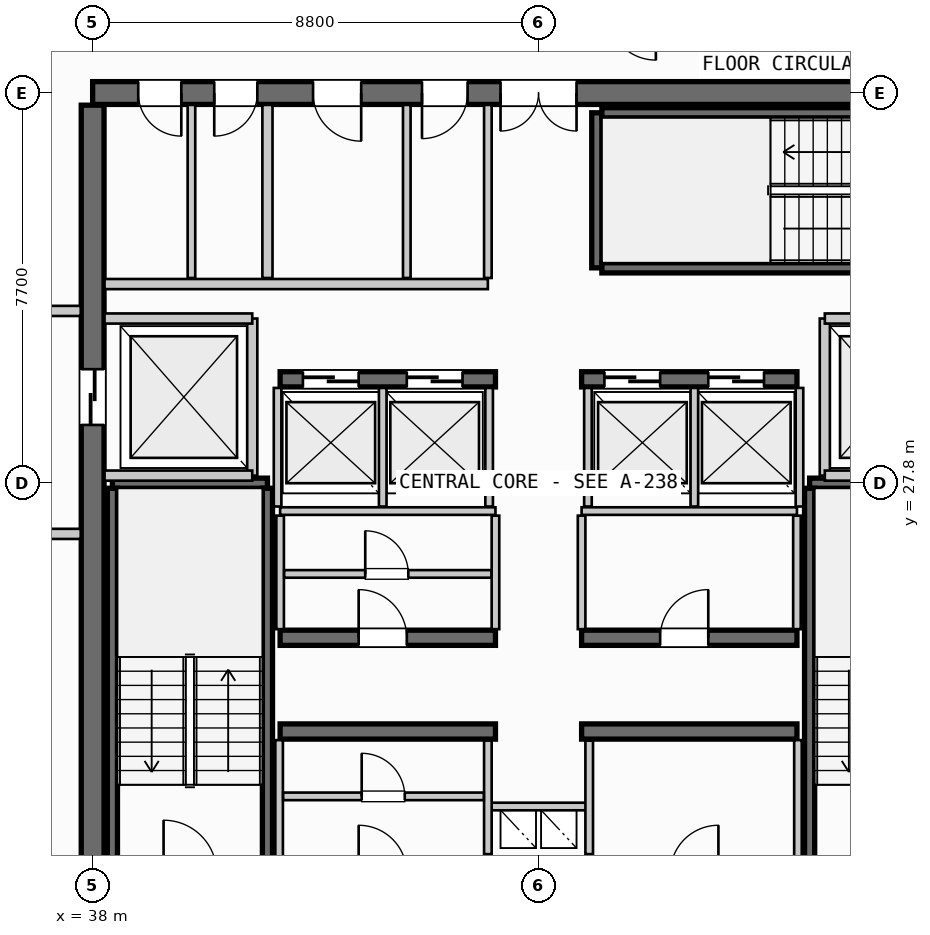
"""IFC4 building model, lengths in metres.
Left out: names, types, materials, properties, quantities, classifications, styles, units other than length and angle.
Written with IfcOpenShell. Run it as: python <this file> out.ifc"""

import sys

from ifc_helpers import new_model, si_unit, direction, frame, frame_2d, origin, place, context, subcontext, project, spatial, rectangle, extrude, source, transform, mapped, element, fill, save


model = new_model("IFC4")
c1 = context("Model", 3, precision=1e-05, world=origin(), true_north=direction((0.0, 1.0)))
c2 = subcontext(c1, "Body", "Model", "MODEL_VIEW")
j1 = project(units=[si_unit("LENGTHUNIT", "METRE"), si_unit("PLANEANGLEUNIT", "RADIAN")], contexts=[c1])
p1 = place(None, origin())
s1 = spatial("IfcSite", under=j1, at=p1, CompositionType="ELEMENT")
p2 = place(p1, origin())
s2 = spatial("IfcBuilding", under=s1, at=p2, CompositionType="ELEMENT")
p3 = place(p2, frame((0.0, 0.0, 273.25)))
s3 = spatial("IfcBuildingStorey", under=s2, at=p3, CompositionType="ELEMENT", Elevation=273.25)
p4 = place(p3, frame((55.6, 35.5, 0.0), z_axis=(0.0, 0.0, 1.0), x_axis=(-1.0, 0.0, 0.0)))
e1 = element("IfcWall", 1, at=p4, inside=s3, PredefinedType="SHEAR", context=c2, shape_type="SweptSolid", body=[
    extrude(rectangle(XDim=17.6, YDim=0.45, at=frame_2d((8.8, 0.0))), origin(), (0.0, 0.0, 1.0), 3.21),
])
p5 = place(p4, frame((8.05, 0.0, 0.0)))
e2 = element("IfcOpeningElement", 2, at=p5, cuts=e1, PredefinedType="OPENING", context=c2, shape_type="SweptSolid", body=[
    extrude(rectangle(XDim=1.5, YDim=2.2, at=frame_2d((0.75, 1.1))), frame((0.0, 0.235, 0.0), z_axis=(0.0, -1.0, 0.0), x_axis=(1.0, 0.0, 0.0)), (0.0, 0.0, 1.0), 0.47),
])
p6 = place(p4, frame((15.85, 0.0, 0.0)))
e3 = element("IfcOpeningElement", 3, at=p6, cuts=e1, PredefinedType="OPENING", context=c2, shape_type="SweptSolid", body=[
    extrude(rectangle(XDim=0.85, YDim=2.15, at=frame_2d((0.425, 1.075))), frame((0.0, 0.235, 0.0), z_axis=(0.0, -1.0, 0.0), x_axis=(1.0, 0.0, 0.0)), (0.0, 0.0, 1.0), 0.47),
])
p7 = place(p4, frame((14.35, 0.0, 0.0)))
e4 = element("IfcOpeningElement", 4, at=p7, cuts=e1, PredefinedType="OPENING", context=c2, shape_type="SweptSolid", body=[
    extrude(rectangle(XDim=0.85, YDim=2.15, at=frame_2d((0.425, 1.075))), frame((0.0, 0.235, 0.0), z_axis=(0.0, -1.0, 0.0), x_axis=(1.0, 0.0, 0.0)), (0.0, 0.0, 1.0), 0.47),
])
p8 = place(p4, frame((12.3, 0.0, 0.0)))
e5 = element("IfcOpeningElement", 5, at=p8, cuts=e1, PredefinedType="OPENING", context=c2, shape_type="SweptSolid", body=[
    extrude(rectangle(XDim=0.95, YDim=2.15, at=frame_2d((0.475, 1.075))), frame((0.0, 0.235, 0.0), z_axis=(0.0, -1.0, 0.0), x_axis=(1.0, 0.0, 0.0)), (0.0, 0.0, 1.0), 0.47),
])
p9 = place(p4, frame((10.2, 0.0, 0.0)))
e6 = element("IfcOpeningElement", 6, at=p9, cuts=e1, PredefinedType="OPENING", context=c2, shape_type="SweptSolid", body=[
    extrude(rectangle(XDim=0.9, YDim=2.15, at=frame_2d((0.45, 1.075))), frame((0.0, 0.235, 0.0), z_axis=(0.0, -1.0, 0.0), x_axis=(1.0, 0.0, 0.0)), (0.0, 0.0, 1.0), 0.47),
])
p10 = place(p3, frame((38.0, 35.26, 0.0), z_axis=(0.0, 0.0, 1.0), x_axis=(0.0, -1.0, 0.0)))
e7 = element("IfcWall", 7, at=p10, inside=s3, PredefinedType="SHEAR", context=c2, shape_type="SweptSolid", body=[
    extrude(rectangle(XDim=14.92, YDim=0.45, at=frame_2d((7.46, 0.0))), origin(), (0.0, 0.0, 1.0), 3.21),
])
p11 = place(p10, frame((5.21, 0.0, 0.0)))
e8 = element("IfcOpeningElement", 8, at=p11, cuts=e7, PredefinedType="OPENING", context=c2, shape_type="SweptSolid", body=[
    extrude(rectangle(XDim=1.1, YDim=2.2, at=frame_2d((0.55, 1.1))), frame((0.0, 0.235, 0.0), z_axis=(0.0, -1.0, 0.0), x_axis=(1.0, 0.0, 0.0)), (0.0, 0.0, 1.0), 0.47),
])
for number, where, z_axis, x_axis in (
    (9, (41.7, 22.9, 0.0), (0.0, 0.0, 1.0), (1.0, 0.0, 0.0)),
    (10, (47.65, 22.9, 0.0), (0.0, 0.0, 1.0), (1.0, 0.0, 0.0)),
):
    element("IfcWall", number, at=place(p3, frame(where, z_axis=z_axis, x_axis=x_axis)), inside=s3, PredefinedType="SHEAR", context=c2, shape_type="SweptSolid", body=[
        extrude(rectangle(XDim=4.25, YDim=0.3, at=frame_2d((2.125, 0.0))), origin(), (0.0, 0.0, 1.0), 3.21),
    ])
p12 = place(p3, frame((41.7, 24.75, 0.0), z_axis=(0.0, 0.0, 1.0), x_axis=(1.0, 0.0, 0.0)))
e11 = element("IfcWall", 11, at=p12, inside=s3, PredefinedType="SHEAR", context=c2, shape_type="SweptSolid", body=[
    extrude(rectangle(XDim=4.25, YDim=0.3, at=frame_2d((2.125, 0.0))), origin(), (0.0, 0.0, 1.0), 3.21),
])
p13 = place(p12, frame((1.55, 0.0, 0.0)))
e12 = element("IfcOpeningElement", 12, at=p13, cuts=e11, PredefinedType="OPENING", context=c2, shape_type="SweptSolid", body=[
    extrude(rectangle(XDim=0.95, YDim=2.15, at=frame_2d((0.475, 1.075))), frame((0.0, 0.16, 0.0), z_axis=(0.0, -1.0, 0.0), x_axis=(1.0, 0.0, 0.0)), (0.0, 0.0, 1.0), 0.32),
])
p14 = place(p3, frame((47.65, 24.75, 0.0), z_axis=(0.0, 0.0, 1.0), x_axis=(1.0, 0.0, 0.0)))
e13 = element("IfcWall", 13, at=p14, inside=s3, PredefinedType="SHEAR", context=c2, shape_type="SweptSolid", body=[
    extrude(rectangle(XDim=4.25, YDim=0.3, at=frame_2d((2.125, 0.0))), origin(), (0.0, 0.0, 1.0), 3.21),
])
p15 = place(p14, frame((1.55, 0.0, 0.0)))
e14 = element("IfcOpeningElement", 14, at=p15, cuts=e13, PredefinedType="OPENING", context=c2, shape_type="SweptSolid", body=[
    extrude(rectangle(XDim=0.95, YDim=2.15, at=frame_2d((0.475, 1.075))), frame((0.0, 0.16, 0.0), z_axis=(0.0, -1.0, 0.0), x_axis=(1.0, 0.0, 0.0)), (0.0, 0.0, 1.0), 0.32),
])
p16 = place(p3, frame((41.7, 29.85, 0.0), z_axis=(0.0, 0.0, 1.0), x_axis=(1.0, 0.0, 0.0)))
e15 = element("IfcWall", 15, at=p16, inside=s3, PredefinedType="SHEAR", context=c2, shape_type="SweptSolid", body=[
    extrude(rectangle(XDim=4.25, YDim=0.3, at=frame_2d((2.125, 0.0))), origin(), (0.0, 0.0, 1.0), 3.21),
])
p17 = place(p16, frame((0.45, 0.0, 0.0)))
e16 = element("IfcOpeningElement", 16, at=p17, cuts=e15, PredefinedType="OPENING", context=c2, shape_type="SweptSolid", body=[
    extrude(rectangle(XDim=1.1, YDim=2.2, at=frame_2d((0.55, 1.1))), frame((0.0, 0.16, 0.0), z_axis=(0.0, -1.0, 0.0), x_axis=(1.0, 0.0, 0.0)), (0.0, 0.0, 1.0), 0.32),
])
p18 = place(p16, frame((2.5, 0.0, 0.0)))
e17 = element("IfcOpeningElement", 17, at=p18, cuts=e15, PredefinedType="OPENING", context=c2, shape_type="SweptSolid", body=[
    extrude(rectangle(XDim=1.1, YDim=2.2, at=frame_2d((0.55, 1.1))), frame((0.0, 0.16, 0.0), z_axis=(0.0, -1.0, 0.0), x_axis=(1.0, 0.0, 0.0)), (0.0, 0.0, 1.0), 0.32),
])
p19 = place(p3, frame((47.65, 29.85, 0.0), z_axis=(0.0, 0.0, 1.0), x_axis=(1.0, 0.0, 0.0)))
e18 = element("IfcWall", 18, at=p19, inside=s3, PredefinedType="SHEAR", context=c2, shape_type="SweptSolid", body=[
    extrude(rectangle(XDim=4.25, YDim=0.3, at=frame_2d((2.125, 0.0))), origin(), (0.0, 0.0, 1.0), 3.21),
])
p20 = place(p19, frame((0.45, 0.0, 0.0)))
e19 = element("IfcOpeningElement", 19, at=p20, cuts=e18, PredefinedType="OPENING", context=c2, shape_type="SweptSolid", body=[
    extrude(rectangle(XDim=1.1, YDim=2.2, at=frame_2d((0.55, 1.1))), frame((0.0, 0.16, 0.0), z_axis=(0.0, -1.0, 0.0), x_axis=(1.0, 0.0, 0.0)), (0.0, 0.0, 1.0), 0.32),
])
p21 = place(p19, frame((2.5, 0.0, 0.0)))
e20 = element("IfcOpeningElement", 20, at=p21, cuts=e18, PredefinedType="OPENING", context=c2, shape_type="SweptSolid", body=[
    extrude(rectangle(XDim=1.1, YDim=2.2, at=frame_2d((0.55, 1.1))), frame((0.0, 0.16, 0.0), z_axis=(0.0, -1.0, 0.0), x_axis=(1.0, 0.0, 0.0)), (0.0, 0.0, 1.0), 0.32),
])
p22 = place(p3, frame((38.39, 27.8, 0.0), z_axis=(0.0, 0.0, 1.0), x_axis=(1.0, 0.0, 0.0)))
e21 = element("IfcWall", 21, at=p22, inside=s3, PredefinedType="SHEAR", context=c2, shape_type="SweptSolid", body=[
    extrude(rectangle(XDim=3.06, YDim=0.2, at=frame_2d((1.53, 0.0))), origin(), (0.0, 0.0, 1.0), 3.21),
])
for number, where, z_axis, x_axis in (
    (22, (41.45, 27.7, 0.0), (0.0, 0.0, 1.0), (0.0, -1.0, 0.0)),
    (23, (38.39, 20.35, 0.0), (0.0, 0.0, 1.0), (0.0, 1.0, 0.0)),
):
    element("IfcWall", number, at=place(p3, frame(where, z_axis=z_axis, x_axis=x_axis)), inside=s3, PredefinedType="SHEAR", context=c2, shape_type="SweptSolid", body=[
        extrude(rectangle(XDim=7.35, YDim=0.2, at=frame_2d((3.675, 0.0))), origin(), (0.0, 0.0, 1.0), 3.21),
    ])
p23 = place(p3, frame((52.15, 27.8, 0.0), z_axis=(0.0, 0.0, 1.0), x_axis=(1.0, 0.0, 0.0)))
e24 = element("IfcWall", 24, at=p23, inside=s3, PredefinedType="SHEAR", context=c2, shape_type="SweptSolid", body=[
    extrude(rectangle(XDim=3.06, YDim=0.2, at=frame_2d((1.53, 0.0))), origin(), (0.0, 0.0, 1.0), 3.21),
])
p24 = place(p3, frame((52.15, 20.35, 0.0), z_axis=(0.0, 0.0, 1.0), x_axis=(0.0, 1.0, 0.0)))
e25 = element("IfcWall", 25, at=p24, inside=s3, PredefinedType="SHEAR", context=c2, shape_type="SweptSolid", body=[
    extrude(rectangle(XDim=7.35, YDim=0.2, at=frame_2d((3.675, 0.0))), origin(), (0.0, 0.0, 1.0), 3.21),
])
p25 = place(p3, frame((47.95, 32.05, 0.0), z_axis=(0.0, 0.0, 1.0), x_axis=(0.0, 1.0, 0.0)))
e26 = element("IfcWall", 26, at=p25, inside=s3, PredefinedType="SHEAR", context=c2, shape_type="SweptSolid", body=[
    extrude(rectangle(XDim=3.06, YDim=0.2, at=frame_2d((1.53, 0.0))), origin(), (0.0, 0.0, 1.0), 3.21),
])
for number, where, z_axis, x_axis in (
    (27, (48.05, 35.11, 0.0), (0.0, 0.0, 1.0), (1.0, 0.0, 0.0)),
    (28, (55.4, 32.05, 0.0), (0.0, 0.0, 1.0), (-1.0, 0.0, 0.0)),
):
    element("IfcWall", number, at=place(p3, frame(where, z_axis=z_axis, x_axis=x_axis)), inside=s3, PredefinedType="SHEAR", context=c2, shape_type="SweptSolid", body=[
        extrude(rectangle(XDim=7.35, YDim=0.2, at=frame_2d((3.675, 0.0))), origin(), (0.0, 0.0, 1.0), 3.21),
    ])
p26 = place(p3, frame((45.8, 21.42, 0.0), z_axis=(0.0, 0.0, 1.0), x_axis=(1.0, 0.0, 0.0)))
e29 = element("IfcWall", 29, at=p26, inside=s3, PredefinedType="PARTITIONING", context=c2, shape_type="SweptSolid", body=[
    extrude(rectangle(XDim=2.0, YDim=0.15, at=frame_2d((1.0, 0.0))), origin(), (0.0, 0.0, 1.0), 2.595),
])
for number, where, z_axis, x_axis in (
    (30, (45.8, 20.48, 0.0), (0.0, 0.0, 1.0), (0.0, 1.0, 0.0)),
    (31, (47.8, 20.48, 0.0), (0.0, 0.0, 1.0), (0.0, 1.0, 0.0)),
):
    element("IfcWall", number, at=place(p3, frame(where, z_axis=z_axis, x_axis=x_axis)), inside=s3, PredefinedType="PARTITIONING", context=c2, shape_type="SweptSolid", body=[
        extrude(rectangle(XDim=2.24, YDim=0.15, at=frame_2d((1.12, 0.0))), origin(), (0.0, 0.0, 1.0), 2.595),
    ])
p27 = place(p3, frame((41.15, 27.95, 0.0), z_axis=(0.0, 0.0, 1.0), x_axis=(0.0, 1.0, 0.0)))
e32 = element("IfcWall", 32, at=p27, inside=s3, PredefinedType="PARTITIONING", context=c2, shape_type="SweptSolid", body=[
    extrude(rectangle(XDim=3.1, YDim=0.2, at=frame_2d((1.55, 0.0))), origin(), (0.0, 0.0, 1.0), 2.595),
])
for number, where, z_axis, x_axis in (
    (33, (38.235, 27.95, 0.0), (0.0, 0.0, 1.0), (1.0, 0.0, 0.0)),
    (34, (38.235, 31.05, 0.0), (0.0, 0.0, 1.0), (1.0, 0.0, 0.0)),
):
    element("IfcWall", number, at=place(p3, frame(where, z_axis=z_axis, x_axis=x_axis)), inside=s3, PredefinedType="PARTITIONING", context=c2, shape_type="SweptSolid", body=[
        extrude(rectangle(XDim=2.915, YDim=0.2, at=frame_2d((1.458, 0.0))), origin(), (0.0, 0.0, 1.0), 2.595),
    ])
for number, where, z_axis, x_axis in (
    (35, (34.5, 26.8, 0.0), (0.0, 0.0, 1.0), (1.0, 0.0, 0.0)),
    (36, (34.5, 31.2, 0.0), (0.0, 0.0, 1.0), (1.0, 0.0, 0.0)),
):
    element("IfcWall", number, at=place(p3, frame(where, z_axis=z_axis, x_axis=x_axis)), inside=s3, PredefinedType="PARTITIONING", context=c2, shape_type="SweptSolid", body=[
        extrude(rectangle(XDim=3.265, YDim=0.2, at=frame_2d((1.632, 0.0))), origin(), (0.0, 0.0, 1.0), 2.595),
    ])
p28 = place(p3, frame((52.45, 27.95, 0.0), z_axis=(0.0, 0.0, 1.0), x_axis=(0.0, 1.0, 0.0)))
e37 = element("IfcWall", 37, at=p28, inside=s3, PredefinedType="PARTITIONING", context=c2, shape_type="SweptSolid", body=[
    extrude(rectangle(XDim=3.1, YDim=0.2, at=frame_2d((1.55, 0.0))), origin(), (0.0, 0.0, 1.0), 2.595),
])
for number, where, z_axis, x_axis in (
    (38, (52.45, 27.95, 0.0), (0.0, 0.0, 1.0), (1.0, 0.0, 0.0)),
    (39, (52.45, 31.05, 0.0), (0.0, 0.0, 1.0), (1.0, 0.0, 0.0)),
):
    element("IfcWall", number, at=place(p3, frame(where, z_axis=z_axis, x_axis=x_axis)), inside=s3, PredefinedType="PARTITIONING", context=c2, shape_type="SweptSolid", body=[
        extrude(rectangle(XDim=2.915, YDim=0.2, at=frame_2d((1.458, 0.0))), origin(), (0.0, 0.0, 1.0), 2.595),
    ])
for number, where, z_axis, x_axis in (
    (40, (41.68, 20.335, 0.0), (0.0, 0.0, 1.0), (0.0, 1.0, 0.0)),
    (41, (51.92, 20.335, 0.0), (0.0, 0.0, 1.0), (0.0, 1.0, 0.0)),
):
    element("IfcWall", number, at=place(p3, frame(where, z_axis=z_axis, x_axis=x_axis)), inside=s3, PredefinedType="PARTITIONING", context=c2, shape_type="SweptSolid", body=[
        extrude(rectangle(XDim=2.395, YDim=0.15, at=frame_2d((1.198, 0.0))), origin(), (0.0, 0.0, 1.0), 2.595),
    ])
p29 = place(p3, frame((41.76, 21.62, 0.0), z_axis=(0.0, 0.0, 1.0), x_axis=(1.0, 0.0, 0.0)))
e42 = element("IfcWall", 42, at=p29, inside=s3, PredefinedType="PARTITIONING", context=c2, shape_type="SweptSolid", body=[
    extrude(rectangle(XDim=3.96, YDim=0.15, at=frame_2d((1.98, 0.0))), origin(), (0.0, 0.0, 1.0), 2.595),
])
p30 = place(p29, frame((1.55, 0.0, 0.0)))
e43 = element("IfcOpeningElement", 43, at=p30, cuts=e42, PredefinedType="OPENING", context=c2, shape_type="SweptSolid", body=[
    extrude(rectangle(XDim=0.85, YDim=2.15, at=frame_2d((0.425, 1.075))), frame((0.0, 0.085, 0.0), z_axis=(0.0, -1.0, 0.0), x_axis=(1.0, 0.0, 0.0)), (0.0, 0.0, 1.0), 0.17),
])
for number, where, z_axis, x_axis in (
    (44, (41.7, 27.25, 0.0), (0.0, 0.0, 1.0), (1.0, 0.0, 0.0)),
    (45, (47.65, 27.25, 0.0), (0.0, 0.0, 1.0), (1.0, 0.0, 0.0)),
):
    element("IfcWall", number, at=place(p3, frame(where, z_axis=z_axis, x_axis=x_axis)), inside=s3, PredefinedType="PARTITIONING", context=c2, shape_type="SweptSolid", body=[
        extrude(rectangle(XDim=4.25, YDim=0.15, at=frame_2d((2.125, 0.0))), origin(), (0.0, 0.0, 1.0), 2.595),
    ])
for number, where, z_axis, x_axis in (
    (46, (41.7, 24.92, 0.0), (0.0, 0.0, 1.0), (0.0, 1.0, 0.0)),
    (47, (45.95, 24.92, 0.0), (0.0, 0.0, 1.0), (0.0, 1.0, 0.0)),
    (48, (47.65, 24.92, 0.0), (0.0, 0.0, 1.0), (0.0, 1.0, 0.0)),
    (49, (51.9, 24.92, 0.0), (0.0, 0.0, 1.0), (0.0, 1.0, 0.0)),
):
    element("IfcWall", number, at=place(p3, frame(where, z_axis=z_axis, x_axis=x_axis)), inside=s3, PredefinedType="PARTITIONING", context=c2, shape_type="SweptSolid", body=[
        extrude(rectangle(XDim=2.24, YDim=0.15, at=frame_2d((1.12, 0.0))), origin(), (0.0, 0.0, 1.0), 2.595),
    ])
p31 = place(p3, frame((41.78, 26.01, 0.0), z_axis=(0.0, 0.0, 1.0), x_axis=(1.0, 0.0, 0.0)))
e50 = element("IfcWall", 50, at=p31, inside=s3, PredefinedType="PARTITIONING", context=c2, shape_type="SweptSolid", body=[
    extrude(rectangle(XDim=4.09, YDim=0.15, at=frame_2d((2.045, 0.0))), origin(), (0.0, 0.0, 1.0), 2.595),
])
p32 = place(p31, frame((1.6, 0.0, 0.0)))
e51 = element("IfcOpeningElement", 51, at=p32, cuts=e50, PredefinedType="OPENING", context=c2, shape_type="SweptSolid", body=[
    extrude(rectangle(XDim=0.85, YDim=2.15, at=frame_2d((0.425, 1.075))), frame((0.0, 0.085, 0.0), z_axis=(0.0, -1.0, 0.0), x_axis=(1.0, 0.0, 0.0)), (0.0, 0.0, 1.0), 0.17),
])
for number, where, z_axis, x_axis in (
    (52, (41.65, 27.34, 0.0), (0.0, 0.0, 1.0), (0.0, 1.0, 0.0)),
    (53, (43.725, 27.34, 0.0), (0.0, 0.0, 1.0), (0.0, 1.0, 0.0)),
    (54, (45.825, 27.34, 0.0), (0.0, 0.0, 1.0), (0.0, 1.0, 0.0)),
    (55, (47.775, 27.34, 0.0), (0.0, 0.0, 1.0), (0.0, 1.0, 0.0)),
    (56, (49.875, 27.34, 0.0), (0.0, 0.0, 1.0), (0.0, 1.0, 0.0)),
    (57, (51.95, 27.34, 0.0), (0.0, 0.0, 1.0), (0.0, 1.0, 0.0)),
):
    element("IfcWall", number, at=place(p3, frame(where, z_axis=z_axis, x_axis=x_axis)), inside=s3, PredefinedType="PARTITIONING", context=c2, shape_type="SweptSolid", body=[
        extrude(rectangle(XDim=2.34, YDim=0.15, at=frame_2d((1.17, 0.0))), origin(), (0.0, 0.0, 1.0), 2.595),
    ])
p33 = place(p3, frame((41.45, 31.85, 0.0), z_axis=(0.0, 0.0, 1.0), x_axis=(0.0, 1.0, 0.0)))
e58 = element("IfcWall", 58, at=p33, inside=s3, PredefinedType="PARTITIONING", context=c2, shape_type="SweptSolid", body=[
    extrude(rectangle(XDim=3.415, YDim=0.2, at=frame_2d((1.708, 0.0))), origin(), (0.0, 0.0, 1.0), 2.595),
])
p34 = place(p3, frame((38.235, 31.73, 0.0), z_axis=(0.0, 0.0, 1.0), x_axis=(1.0, 0.0, 0.0)))
e59 = element("IfcWall", 59, at=p34, inside=s3, PredefinedType="PARTITIONING", context=c2, shape_type="SweptSolid", body=[
    extrude(rectangle(XDim=7.565, YDim=0.2, at=frame_2d((3.782, 0.0))), origin(), (0.0, 0.0, 1.0), 2.595),
])
for number, where, z_axis, x_axis in (
    (60, (45.8, 31.85, 0.0), (0.0, 0.0, 1.0), (0.0, 1.0, 0.0)),
    (61, (39.95, 31.85, 0.0), (0.0, 0.0, 1.0), (0.0, 1.0, 0.0)),
):
    element("IfcWall", number, at=place(p3, frame(where, z_axis=z_axis, x_axis=x_axis)), inside=s3, PredefinedType="PARTITIONING", context=c2, shape_type="SweptSolid", body=[
        extrude(rectangle(XDim=3.415, YDim=0.15, at=frame_2d((1.708, 0.0))), origin(), (0.0, 0.0, 1.0), 2.595),
    ])
p35 = place(p3, frame((44.2, 31.85, 0.0), z_axis=(0.0, 0.0, 1.0), x_axis=(0.0, 1.0, 0.0)))
e62 = element("IfcWall", 62, at=p35, inside=s3, PredefinedType="PLUMBINGWALL", context=c2, shape_type="SweptSolid", body=[
    extrude(rectangle(XDim=3.415, YDim=0.15, at=frame_2d((1.708, 0.0))), origin(), (0.0, 0.0, 1.0), 2.595),
])
m1 = source(origin(), c2, "Body", "SweptSolid", [
    extrude(rectangle(XDim=1.5, YDim=2.2, at=frame_2d((0.75, 1.1))), frame((0.0, 0.025, 0.0), z_axis=(0.0, -1.0, 0.0), x_axis=(1.0, 0.0, 0.0)), (0.0, 0.0, 1.0), 0.05),
])
p36 = place(p5, origin())
e63 = element("IfcDoor", 63, at=p36, inside=s3, OperationType="DOUBLE_DOOR_SINGLE_SWING", PredefinedType="DOOR", context=c2, shape_type="MappedRepresentation", body=[
    mapped(m1, transform((0.0, 0.0, 0.0), scale=1.0)),
])
fill(e2, e63)
m2 = source(origin(), c2, "Body", "SweptSolid", [
    extrude(rectangle(XDim=1.1, YDim=2.2, at=frame_2d((0.55, 1.1))), frame((0.0, 0.025, 0.0), z_axis=(0.0, -1.0, 0.0), x_axis=(1.0, 0.0, 0.0)), (0.0, 0.0, 1.0), 0.05),
])
p37 = place(p11, origin())
e64 = element("IfcDoor", 64, at=p37, inside=s3, OperationType="SLIDING_TO_LEFT", PredefinedType="DOOR", context=c2, shape_type="MappedRepresentation", body=[
    mapped(m2, transform((0.0, 0.0, 0.0), scale=1.0)),
])
fill(e8, e64)
m3 = source(origin(), c2, "Body", "SweptSolid", [
    extrude(rectangle(XDim=0.95, YDim=2.15, at=frame_2d((0.475, 1.075))), frame((0.0, 0.025, 0.0), z_axis=(0.0, -1.0, 0.0), x_axis=(1.0, 0.0, 0.0)), (0.0, 0.0, 1.0), 0.05),
])
p38 = place(p13, origin())
e65 = element("IfcDoor", 65, at=p38, inside=s3, OperationType="SINGLE_SWING_LEFT", PredefinedType="DOOR", context=c2, shape_type="MappedRepresentation", body=[
    mapped(m3, transform((0.0, 0.0, 0.0), scale=1.0)),
])
fill(e12, e65)
p39 = place(p15, origin())
e66 = element("IfcDoor", 66, at=p39, inside=s3, OperationType="SINGLE_SWING_RIGHT", PredefinedType="DOOR", context=c2, shape_type="MappedRepresentation", body=[
    mapped(m3, transform((0.0, 0.0, 0.0), scale=1.0)),
])
fill(e14, e66)
p40 = place(p17, origin())
e67 = element("IfcDoor", 67, at=p40, inside=s3, OperationType="SLIDING_TO_LEFT", PredefinedType="DOOR", context=c2, shape_type="MappedRepresentation", body=[
    mapped(m2, transform((0.0, 0.0, 0.0), scale=1.0)),
])
fill(e16, e67)
p41 = place(p18, origin())
e68 = element("IfcDoor", 68, at=p41, inside=s3, OperationType="SLIDING_TO_LEFT", PredefinedType="DOOR", context=c2, shape_type="MappedRepresentation", body=[
    mapped(m2, transform((0.0, 0.0, 0.0), scale=1.0)),
])
fill(e17, e68)
p42 = place(p20, origin())
e69 = element("IfcDoor", 69, at=p42, inside=s3, OperationType="SLIDING_TO_LEFT", PredefinedType="DOOR", context=c2, shape_type="MappedRepresentation", body=[
    mapped(m2, transform((0.0, 0.0, 0.0), scale=1.0)),
])
fill(e19, e69)
p43 = place(p21, origin())
e70 = element("IfcDoor", 70, at=p43, inside=s3, OperationType="SLIDING_TO_LEFT", PredefinedType="DOOR", context=c2, shape_type="MappedRepresentation", body=[
    mapped(m2, transform((0.0, 0.0, 0.0), scale=1.0)),
])
fill(e20, e70)
m4 = source(origin(), c2, "Body", "SweptSolid", [
    extrude(rectangle(XDim=0.85, YDim=2.15, at=frame_2d((0.425, 1.075))), frame((0.0, 0.025, 0.0), z_axis=(0.0, -1.0, 0.0), x_axis=(1.0, 0.0, 0.0)), (0.0, 0.0, 1.0), 0.05),
])
p44 = place(p6, origin())
e71 = element("IfcDoor", 71, at=p44, inside=s3, OperationType="SINGLE_SWING_LEFT", PredefinedType="DOOR", context=c2, shape_type="MappedRepresentation", body=[
    mapped(m4, transform((0.0, 0.0, 0.0), scale=1.0)),
])
fill(e3, e71)
p45 = place(p7, origin())
e72 = element("IfcDoor", 72, at=p45, inside=s3, OperationType="SINGLE_SWING_RIGHT", PredefinedType="DOOR", context=c2, shape_type="MappedRepresentation", body=[
    mapped(m4, transform((0.0, 0.0, 0.0), scale=1.0)),
])
fill(e4, e72)
p46 = place(p8, origin())
e73 = element("IfcDoor", 73, at=p46, inside=s3, OperationType="SINGLE_SWING_LEFT", PredefinedType="DOOR", context=c2, shape_type="MappedRepresentation", body=[
    mapped(m3, transform((0.0, 0.0, 0.0), scale=1.0)),
])
fill(e5, e73)
m5 = source(origin(), c2, "Body", "SweptSolid", [
    extrude(rectangle(XDim=0.9, YDim=2.15, at=frame_2d((0.45, 1.075))), frame((0.0, 0.025, 0.0), z_axis=(0.0, -1.0, 0.0), x_axis=(1.0, 0.0, 0.0)), (0.0, 0.0, 1.0), 0.05),
])
p47 = place(p9, origin())
e74 = element("IfcDoor", 74, at=p47, inside=s3, OperationType="SINGLE_SWING_RIGHT", PredefinedType="DOOR", context=c2, shape_type="MappedRepresentation", body=[
    mapped(m5, transform((0.0, 0.0, 0.0), scale=1.0)),
])
fill(e6, e74)
p48 = place(p30, origin())
e75 = element("IfcDoor", 75, at=p48, inside=s3, OperationType="SINGLE_SWING_LEFT", PredefinedType="DOOR", context=c2, shape_type="MappedRepresentation", body=[
    mapped(m4, transform((0.0, 0.0, 0.0), scale=1.0)),
])
fill(e43, e75)
p49 = place(p32, origin())
e76 = element("IfcDoor", 76, at=p49, inside=s3, OperationType="SINGLE_SWING_LEFT", PredefinedType="DOOR", context=c2, shape_type="MappedRepresentation", body=[
    mapped(m4, transform((0.0, 0.0, 0.0), scale=1.0)),
])
fill(e51, e76)
save(model, sys.argv[1])
